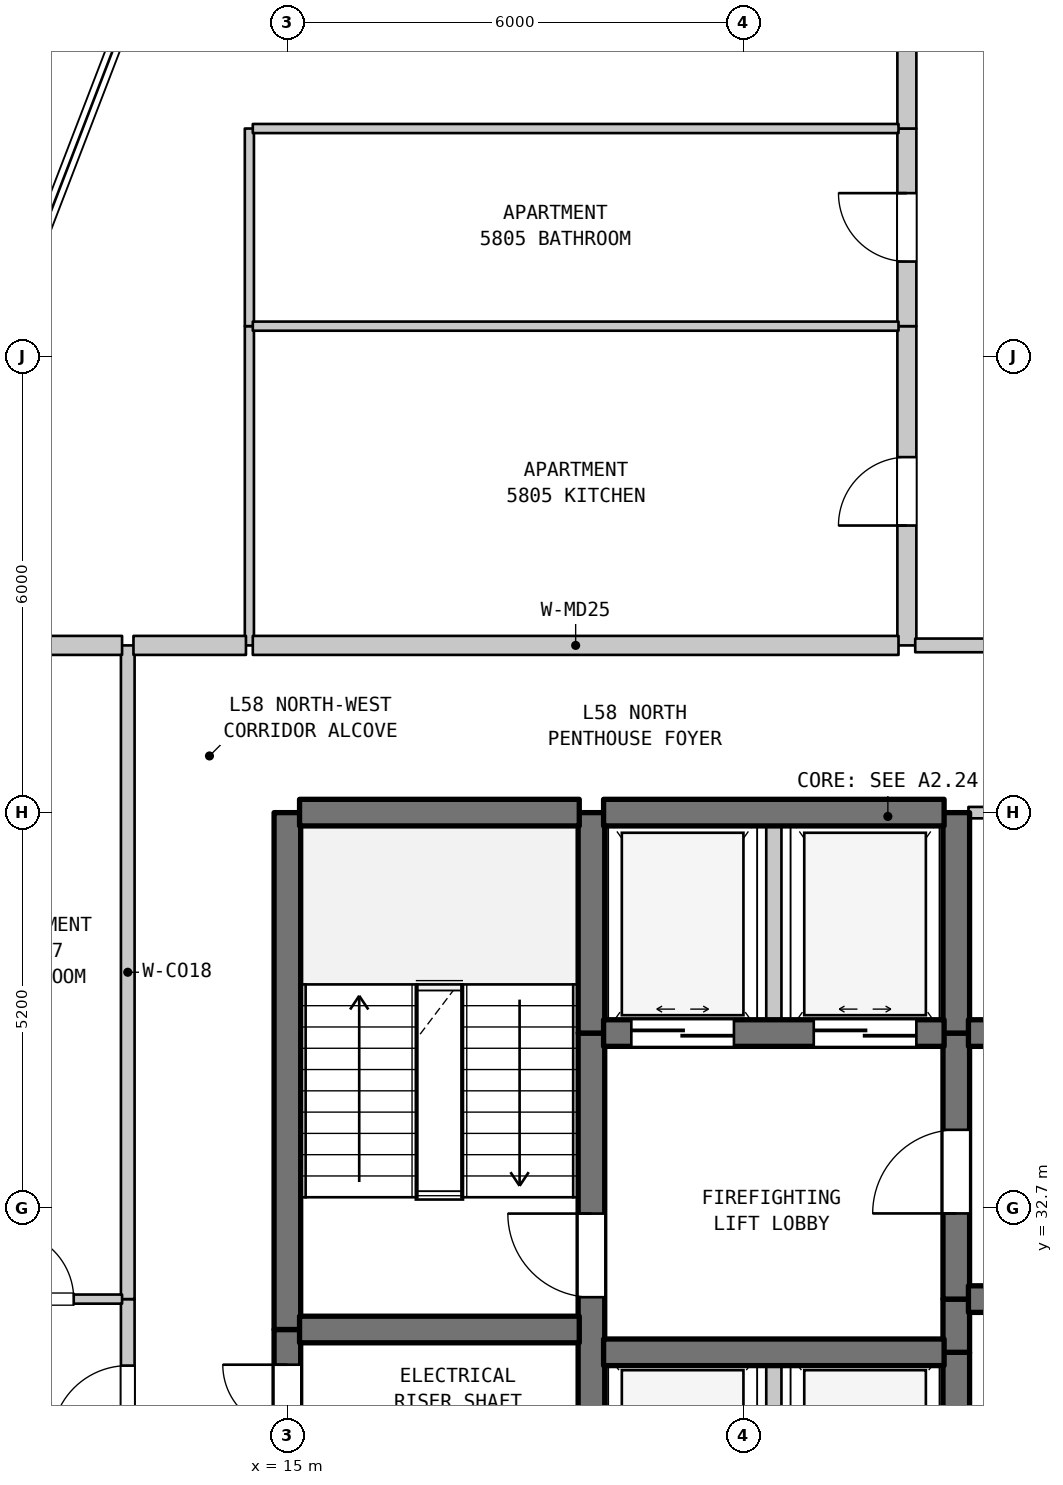
"""IFC4 building model, lengths in metres.
Left out: names, types, materials, properties, quantities, classifications, styles, units other than length and angle.
Written with IfcOpenShell. Run it as: python <this file> out.ifc"""

import sys

from ifc_helpers import new_model, si_unit, direction, frame, frame_2d, origin, place, context, subcontext, project, spatial, rectangle, extrude, element, fill, save


model = new_model("IFC4")
c1 = context("Model", 3, precision=1e-05, world=origin(), true_north=direction((0.0, 1.0)))
c2 = subcontext(c1, "Body", "Model", "MODEL_VIEW")
j1 = project(units=[si_unit("LENGTHUNIT", "METRE"), si_unit("PLANEANGLEUNIT", "RADIAN")], contexts=[c1])
p1 = place(None, origin())
s1 = spatial("IfcSite", under=j1, at=p1, CompositionType="ELEMENT")
p2 = place(p1, origin())
s2 = spatial("IfcBuilding", under=s1, at=p2, CompositionType="ELEMENT")
p3 = place(p2, frame((0.0, 0.0, 233.9)))
s3 = spatial("IfcBuildingStorey", under=s2, at=p3, CompositionType="ELEMENT", Elevation=233.9)
p4 = place(p3, frame((12.9, 28.75, 0.0), z_axis=(0.0, 0.0, 1.0), x_axis=(0.0, 1.0, 0.0)))
e1 = element("IfcWall", 1, at=p4, inside=s3, PredefinedType="STANDARD", context=c2, shape_type="SweptSolid", body=[
    extrude(rectangle(XDim=2.75, YDim=0.18, at=frame_2d((1.375, 0.0))), origin(), (0.0, 0.0, 1.0), 3.28),
])
p5 = place(p4, frame((0.875, 0.0, 0.0)))
e2 = element("IfcOpeningElement", 2, at=p5, cuts=e1, PredefinedType="OPENING", context=c2, shape_type="SweptSolid", body=[
    extrude(rectangle(XDim=1.0, YDim=2.15, at=frame_2d((0.5, 1.075))), frame((0.0, 0.1, 0.0), z_axis=(0.0, -1.0, 0.0), x_axis=(1.0, 0.0, 0.0)), (0.0, 0.0, 1.0), 0.2),
])
p6 = place(p3, frame((12.9, 31.5, 0.0), z_axis=(0.0, 0.0, 1.0), x_axis=(0.0, 1.0, 0.0)))
e3 = element("IfcWall", 3, at=p6, inside=s3, PredefinedType="STANDARD", context=c2, shape_type="SweptSolid", body=[
    extrude(rectangle(XDim=8.6, YDim=0.18, at=frame_2d((4.3, 0.0))), origin(), (0.0, 0.0, 1.0), 3.28),
])
p7 = place(p3, frame((14.5, 40.1, 0.0), z_axis=(0.0, 0.0, 1.0), x_axis=(0.0, 1.0, 0.0)))
e4 = element("IfcWall", 4, at=p7, inside=s3, PredefinedType="PARTITIONING", context=c2, shape_type="SweptSolid", body=[
    extrude(rectangle(XDim=4.2, YDim=0.12, at=frame_2d((2.1, 0.0))), origin(), (0.0, 0.0, 1.0), 3.28),
])
p8 = place(p3, frame((14.5, 44.3, 0.0), z_axis=(0.0, 0.0, 1.0), x_axis=(0.0, 1.0, 0.0)))
e5 = element("IfcWall", 5, at=p8, inside=s3, PredefinedType="PARTITIONING", context=c2, shape_type="SweptSolid", body=[
    extrude(rectangle(XDim=2.6, YDim=0.12, at=frame_2d((1.3, 0.0))), origin(), (0.0, 0.0, 1.0), 3.28),
])
p9 = place(p3, frame((15.0, 29.5, 0.0), z_axis=(0.0, 0.0, 1.0), x_axis=(0.0, 1.0, 0.0)))
e6 = element("IfcWall", 6, at=p9, inside=s3, PredefinedType="SHEAR", context=c2, shape_type="SweptSolid", body=[
    extrude(rectangle(XDim=1.6, YDim=0.35, at=frame_2d((0.8, 0.0))), origin(), (0.0, 0.0, 1.0), 3.28),
])
p10 = place(p9, frame((0.287, 0.0, 0.0)))
e7 = element("IfcOpeningElement", 7, at=p10, cuts=e6, PredefinedType="OPENING", context=c2, shape_type="SweptSolid", body=[
    extrude(rectangle(XDim=0.85, YDim=2.1, at=frame_2d((0.425, 1.05))), frame((0.0, 0.185, 0.0), z_axis=(0.0, -1.0, 0.0), x_axis=(1.0, 0.0, 0.0)), (0.0, 0.0, 1.0), 0.37),
])
p11 = place(p3, frame((15.0, 31.1, 0.0), z_axis=(0.0, 0.0, 1.0), x_axis=(0.0, 1.0, 0.0)))
e8 = element("IfcWall", 8, at=p11, inside=s3, PredefinedType="SHEAR", context=c2, shape_type="SweptSolid", body=[
    extrude(rectangle(XDim=6.8, YDim=0.35, at=frame_2d((3.4, 0.0))), origin(), (0.0, 0.0, 1.0), 3.28),
])
p12 = place(p3, frame((19.0, 29.5, 0.0), z_axis=(0.0, 0.0, 1.0), x_axis=(0.0, 1.0, 0.0)))
e9 = element("IfcWall", 9, at=p12, inside=s3, PredefinedType="SHEAR", context=c2, shape_type="SweptSolid", body=[
    extrude(rectangle(XDim=5.5, YDim=0.35, at=frame_2d((2.75, 0.0))), origin(), (0.0, 0.0, 1.0), 3.28),
])
p13 = place(p12, frame((2.025, 0.0, 0.0)))
e10 = element("IfcOpeningElement", 10, at=p13, cuts=e9, PredefinedType="OPENING", context=c2, shape_type="SweptSolid", body=[
    extrude(rectangle(XDim=1.1, YDim=2.15, at=frame_2d((0.55, 1.075))), frame((0.0, 0.185, 0.0), z_axis=(0.0, -1.0, 0.0), x_axis=(1.0, 0.0, 0.0)), (0.0, 0.0, 1.0), 0.37),
])
p14 = place(p3, frame((19.0, 35.0, 0.0), z_axis=(0.0, 0.0, 1.0), x_axis=(0.0, 1.0, 0.0)))
e11 = element("IfcWall", 11, at=p14, inside=s3, PredefinedType="SHEAR", context=c2, shape_type="SweptSolid", body=[
    extrude(rectangle(XDim=2.9, YDim=0.35, at=frame_2d((1.45, 0.0))), origin(), (0.0, 0.0, 1.0), 3.28),
])
p15 = place(p3, frame((21.4, 28.2, 0.0), z_axis=(0.0, 0.0, 1.0), x_axis=(0.0, 1.0, 0.0)))
e12 = element("IfcWall", 12, at=p15, inside=s3, PredefinedType="STANDARD", context=c2, shape_type="SweptSolid", body=[
    extrude(rectangle(XDim=2.6, YDim=0.2, at=frame_2d((1.3, 0.0))), origin(), (0.0, 0.0, 1.0), 3.28),
])
p16 = place(p3, frame((21.4, 35.0, 0.0), z_axis=(0.0, 0.0, 1.0), x_axis=(0.0, 1.0, 0.0)))
e13 = element("IfcWall", 13, at=p16, inside=s3, PredefinedType="STANDARD", context=c2, shape_type="SweptSolid", body=[
    extrude(rectangle(XDim=2.9, YDim=0.2, at=frame_2d((1.45, 0.0))), origin(), (0.0, 0.0, 1.0), 3.28),
])
p17 = place(p3, frame((23.15, 40.1, 0.0), z_axis=(0.0, 0.0, 1.0), x_axis=(0.0, 1.0, 0.0)))
e14 = element("IfcWall", 14, at=p17, inside=s3, PredefinedType="STANDARD", context=c2, shape_type="SweptSolid", body=[
    extrude(rectangle(XDim=4.2, YDim=0.25, at=frame_2d((2.1, 0.0))), origin(), (0.0, 0.0, 1.0), 3.28),
])
p18 = place(p17, frame((1.577, 0.0, 0.0)))
e15 = element("IfcOpeningElement", 15, at=p18, cuts=e14, PredefinedType="OPENING", context=c2, shape_type="SweptSolid", body=[
    extrude(rectangle(XDim=0.9, YDim=2.15, at=frame_2d((0.45, 1.075))), frame((0.0, 0.135, 0.0), z_axis=(0.0, -1.0, 0.0), x_axis=(1.0, 0.0, 0.0)), (0.0, 0.0, 1.0), 0.27),
])
p19 = place(p3, frame((23.15, 44.3, 0.0), z_axis=(0.0, 0.0, 1.0), x_axis=(0.0, 1.0, 0.0)))
e16 = element("IfcWall", 16, at=p19, inside=s3, PredefinedType="STANDARD", context=c2, shape_type="SweptSolid", body=[
    extrude(rectangle(XDim=2.6, YDim=0.25, at=frame_2d((1.3, 0.0))), origin(), (0.0, 0.0, 1.0), 3.28),
])
p20 = place(p19, frame((0.85, 0.0, 0.0)))
e17 = element("IfcOpeningElement", 17, at=p20, cuts=e16, PredefinedType="OPENING", context=c2, shape_type="SweptSolid", body=[
    extrude(rectangle(XDim=0.9, YDim=2.1, at=frame_2d((0.45, 1.05))), frame((0.0, 0.135, 0.0), z_axis=(0.0, -1.0, 0.0), x_axis=(1.0, 0.0, 0.0)), (0.0, 0.0, 1.0), 0.27),
])
p21 = place(p3, frame((23.15, 46.9, 0.0), z_axis=(0.0, 0.0, 1.0), x_axis=(0.0, 1.0, 0.0)))
e18 = element("IfcWall", 18, at=p21, inside=s3, PredefinedType="STANDARD", context=c2, shape_type="SweptSolid", body=[
    extrude(rectangle(XDim=6.99, YDim=0.25, at=frame_2d((3.495, 0.0))), origin(), (0.0, 0.0, 1.0), 3.28),
])
p22 = place(p21, frame((2.949, 0.0, 0.0)))
e19 = element("IfcOpeningElement", 19, at=p22, cuts=e18, PredefinedType="OPENING", context=c2, shape_type="SweptSolid", body=[
    extrude(rectangle(XDim=0.95, YDim=2.15, at=frame_2d((0.475, 1.075))), frame((0.0, 0.135, 0.0), z_axis=(0.0, -1.0, 0.0), x_axis=(1.0, 0.0, 0.0)), (0.0, 0.0, 1.0), 0.27),
])
p23 = place(p3, frame((23.8, 29.5, 0.0), z_axis=(0.0, 0.0, 1.0), x_axis=(0.0, 1.0, 0.0)))
e20 = element("IfcWall", 20, at=p23, inside=s3, PredefinedType="SHEAR", context=c2, shape_type="SweptSolid", body=[
    extrude(rectangle(XDim=1.3, YDim=0.35, at=frame_2d((0.65, 0.0))), origin(), (0.0, 0.0, 1.0), 3.28),
])
p24 = place(p3, frame((23.8, 30.8, 0.0), z_axis=(0.0, 0.0, 1.0), x_axis=(0.0, 1.0, 0.0)))
e21 = element("IfcWall", 21, at=p24, inside=s3, PredefinedType="SHEAR", context=c2, shape_type="SweptSolid", body=[
    extrude(rectangle(XDim=0.7, YDim=0.35, at=frame_2d((0.35, 0.0))), origin(), (0.0, 0.0, 1.0), 3.28),
])
p25 = place(p3, frame((23.8, 31.5, 0.0), z_axis=(0.0, 0.0, 1.0), x_axis=(0.0, 1.0, 0.0)))
e22 = element("IfcWall", 22, at=p25, inside=s3, PredefinedType="SHEAR", context=c2, shape_type="SweptSolid", body=[
    extrude(rectangle(XDim=3.5, YDim=0.35, at=frame_2d((1.75, 0.0))), origin(), (0.0, 0.0, 1.0), 3.28),
])
p26 = place(p25, frame((1.127, 0.0, 0.0)))
e23 = element("IfcOpeningElement", 23, at=p26, cuts=e22, PredefinedType="OPENING", context=c2, shape_type="SweptSolid", body=[
    extrude(rectangle(XDim=1.1, YDim=2.15, at=frame_2d((0.55, 1.075))), frame((0.0, 0.185, 0.0), z_axis=(0.0, -1.0, 0.0), x_axis=(1.0, 0.0, 0.0)), (0.0, 0.0, 1.0), 0.37),
])
p27 = place(p3, frame((23.8, 35.0, 0.0), z_axis=(0.0, 0.0, 1.0), x_axis=(0.0, 1.0, 0.0)))
e24 = element("IfcWall", 24, at=p27, inside=s3, PredefinedType="SHEAR", context=c2, shape_type="SweptSolid", body=[
    extrude(rectangle(XDim=2.9, YDim=0.35, at=frame_2d((1.45, 0.0))), origin(), (0.0, 0.0, 1.0), 3.28),
])
p28 = place(p3, frame((19.16, 30.8, 0.0), z_axis=(0.0, 0.0, 1.0), x_axis=(1.0, 0.0, 0.0)))
e25 = element("IfcWall", 25, at=p28, inside=s3, PredefinedType="SHEAR", context=c2, shape_type="SweptSolid", body=[
    extrude(rectangle(XDim=4.48, YDim=0.35, at=frame_2d((2.24, 0.0))), origin(), (0.0, 0.0, 1.0), 3.28),
])
p29 = place(p3, frame((15.16, 31.1, 0.0), z_axis=(0.0, 0.0, 1.0), x_axis=(1.0, 0.0, 0.0)))
e26 = element("IfcWall", 26, at=p29, inside=s3, PredefinedType="SHEAR", context=c2, shape_type="SweptSolid", body=[
    extrude(rectangle(XDim=3.68, YDim=0.35, at=frame_2d((1.84, 0.0))), origin(), (0.0, 0.0, 1.0), 3.28),
])
p30 = place(p3, frame((10.623, 31.5, 0.0), z_axis=(0.0, 0.0, 1.0), x_axis=(1.0, 0.0, 0.0)))
e27 = element("IfcWall", 27, at=p30, inside=s3, PredefinedType="PARTITIONING", context=c2, shape_type="SweptSolid", body=[
    extrude(rectangle(XDim=2.202, YDim=0.12, at=frame_2d((1.101, 0.0))), origin(), (0.0, 0.0, 1.0), 3.28),
])
p31 = place(p30, frame((0.666, 0.0, 0.0)))
e28 = element("IfcOpeningElement", 28, at=p31, cuts=e27, PredefinedType="OPENING", context=c2, shape_type="SweptSolid", body=[
    extrude(rectangle(XDim=0.9, YDim=2.1, at=frame_2d((0.45, 1.05))), frame((0.0, 0.07, 0.0), z_axis=(0.0, -1.0, 0.0), x_axis=(1.0, 0.0, 0.0)), (0.0, 0.0, 1.0), 0.14),
])
p32 = place(p3, frame((23.96, 31.5, 0.0), z_axis=(0.0, 0.0, 1.0), x_axis=(1.0, 0.0, 0.0)))
e29 = element("IfcWall", 29, at=p32, inside=s3, PredefinedType="SHEAR", context=c2, shape_type="SweptSolid", body=[
    extrude(rectangle(XDim=3.18, YDim=0.35, at=frame_2d((1.59, 0.0))), origin(), (0.0, 0.0, 1.0), 3.28),
])
p33 = place(p32, frame((1.094, 0.0, 0.0)))
e30 = element("IfcOpeningElement", 30, at=p33, cuts=e29, PredefinedType="OPENING", context=c2, shape_type="SweptSolid", body=[
    extrude(rectangle(XDim=0.85, YDim=2.1, at=frame_2d((0.425, 1.05))), frame((0.0, 0.185, 0.0), z_axis=(0.0, -1.0, 0.0), x_axis=(1.0, 0.0, 0.0)), (0.0, 0.0, 1.0), 0.37),
])
p34 = place(p3, frame((19.16, 35.0, 0.0), z_axis=(0.0, 0.0, 1.0), x_axis=(1.0, 0.0, 0.0)))
e31 = element("IfcWall", 31, at=p34, inside=s3, PredefinedType="SHEAR", context=c2, shape_type="SweptSolid", body=[
    extrude(rectangle(XDim=4.48, YDim=0.35, at=frame_2d((2.24, 0.0))), origin(), (0.0, 0.0, 1.0), 3.28),
])
p35 = place(p34, frame((0.365, 0.0, 0.0)))
e32 = element("IfcOpeningElement", 32, at=p35, cuts=e31, PredefinedType="OPENING", context=c2, shape_type="SweptSolid", body=[
    extrude(rectangle(XDim=1.35, YDim=2.2, at=frame_2d((0.675, 1.1))), frame((0.0, 0.185, 0.0), z_axis=(0.0, -1.0, 0.0), x_axis=(1.0, 0.0, 0.0)), (0.0, 0.0, 1.0), 0.37),
])
p36 = place(p34, frame((2.765, 0.0, 0.0)))
e33 = element("IfcOpeningElement", 33, at=p36, cuts=e31, PredefinedType="OPENING", context=c2, shape_type="SweptSolid", body=[
    extrude(rectangle(XDim=1.35, YDim=2.2, at=frame_2d((0.675, 1.1))), frame((0.0, 0.185, 0.0), z_axis=(0.0, -1.0, 0.0), x_axis=(1.0, 0.0, 0.0)), (0.0, 0.0, 1.0), 0.37),
])
p37 = place(p3, frame((23.96, 35.0, 0.0), z_axis=(0.0, 0.0, 1.0), x_axis=(1.0, 0.0, 0.0)))
e34 = element("IfcWall", 34, at=p37, inside=s3, PredefinedType="SHEAR", context=c2, shape_type="SweptSolid", body=[
    extrude(rectangle(XDim=3.995, YDim=0.35, at=frame_2d((1.998, 0.0))), origin(), (0.0, 0.0, 1.0), 3.28),
])
p38 = place(p37, frame((1.393, 0.0, 0.0)))
e35 = element("IfcOpeningElement", 35, at=p38, cuts=e34, PredefinedType="OPENING", context=c2, shape_type="SweptSolid", body=[
    extrude(rectangle(XDim=0.95, YDim=2.15, at=frame_2d((0.475, 1.075))), frame((0.0, 0.185, 0.0), z_axis=(0.0, -1.0, 0.0), x_axis=(1.0, 0.0, 0.0)), (0.0, 0.0, 1.0), 0.37),
])
p39 = place(p3, frame((15.16, 37.9, 0.0), z_axis=(0.0, 0.0, 1.0), x_axis=(1.0, 0.0, 0.0)))
e36 = element("IfcWall", 36, at=p39, inside=s3, PredefinedType="SHEAR", context=c2, shape_type="SweptSolid", body=[
    extrude(rectangle(XDim=3.68, YDim=0.35, at=frame_2d((1.84, 0.0))), origin(), (0.0, 0.0, 1.0), 3.28),
])
p40 = place(p3, frame((19.16, 37.9, 0.0), z_axis=(0.0, 0.0, 1.0), x_axis=(1.0, 0.0, 0.0)))
e37 = element("IfcWall", 37, at=p40, inside=s3, PredefinedType="SHEAR", context=c2, shape_type="SweptSolid", body=[
    extrude(rectangle(XDim=4.48, YDim=0.35, at=frame_2d((2.24, 0.0))), origin(), (0.0, 0.0, 1.0), 3.28),
])
p41 = place(p3, frame((23.96, 37.9, 0.0), z_axis=(0.0, 0.0, 1.0), x_axis=(1.0, 0.0, 0.0)))
e38 = element("IfcWall", 38, at=p41, inside=s3, PredefinedType="STANDARD", context=c2, shape_type="SweptSolid", body=[
    extrude(rectangle(XDim=3.995, YDim=0.15, at=frame_2d((1.998, 0.0))), origin(), (0.0, 0.0, 1.0), 2.68),
])
p42 = place(p3, frame((10.623, 40.1, 0.0), z_axis=(0.0, 0.0, 1.0), x_axis=(1.0, 0.0, 0.0)))
e39 = element("IfcWall", 39, at=p42, inside=s3, PredefinedType="STANDARD", context=c2, shape_type="SweptSolid", body=[
    extrude(rectangle(XDim=2.202, YDim=0.25, at=frame_2d((1.101, 0.0))), origin(), (0.0, 0.0, 1.0), 3.28),
])
p43 = place(p3, frame((12.975, 40.1, 0.0), z_axis=(0.0, 0.0, 1.0), x_axis=(1.0, 0.0, 0.0)))
e40 = element("IfcWall", 40, at=p43, inside=s3, PredefinedType="STANDARD", context=c2, shape_type="SweptSolid", body=[
    extrude(rectangle(XDim=1.48, YDim=0.25, at=frame_2d((0.74, 0.0))), origin(), (0.0, 0.0, 1.0), 3.28),
])
p44 = place(p3, frame((14.545, 40.1, 0.0), z_axis=(0.0, 0.0, 1.0), x_axis=(1.0, 0.0, 0.0)))
e41 = element("IfcWall", 41, at=p44, inside=s3, PredefinedType="STANDARD", context=c2, shape_type="SweptSolid", body=[
    extrude(rectangle(XDim=8.495, YDim=0.25, at=frame_2d((4.248, 0.0))), origin(), (0.0, 0.0, 1.0), 3.28),
])
p45 = place(p3, frame((23.26, 40.1, 0.0), z_axis=(0.0, 0.0, 1.0), x_axis=(1.0, 0.0, 0.0)))
e42 = element("IfcWall", 42, at=p45, inside=s3, PredefinedType="STANDARD", context=c2, shape_type="SweptSolid", body=[
    extrude(rectangle(XDim=5.845, YDim=0.18, at=frame_2d((2.922, 0.0))), origin(), (0.0, 0.0, 1.0), 3.28),
])
p46 = place(p45, frame((2.39, 0.0, 0.0)))
e43 = element("IfcOpeningElement", 43, at=p46, cuts=e42, PredefinedType="OPENING", context=c2, shape_type="SweptSolid", body=[
    extrude(rectangle(XDim=1.0, YDim=2.15, at=frame_2d((0.5, 1.075))), frame((0.0, 0.1, 0.0), z_axis=(0.0, -1.0, 0.0), x_axis=(1.0, 0.0, 0.0)), (0.0, 0.0, 1.0), 0.2),
])
for number, where, z_axis, x_axis in (
    (44, (14.545, 44.3, 0.0), (0.0, 0.0, 1.0), (1.0, 0.0, 0.0)),
    (45, (14.545, 46.9, 0.0), (0.0, 0.0, 1.0), (1.0, 0.0, 0.0)),
):
    element("IfcWall", number, at=place(p3, frame(where, z_axis=z_axis, x_axis=x_axis)), inside=s3, PredefinedType="PARTITIONING", context=c2, shape_type="SweptSolid", body=[
        extrude(rectangle(XDim=8.495, YDim=0.12, at=frame_2d((4.248, 0.0))), origin(), (0.0, 0.0, 1.0), 3.28),
    ])
p47 = place(p5, origin())
e46 = element("IfcDoor", 46, at=p47, inside=s3, OperationType="SINGLE_SWING_LEFT", PredefinedType="DOOR", context=c2, shape_type="SweptSolid", body=[
    extrude(rectangle(XDim=1.0, YDim=2.15, at=frame_2d((0.5, 1.075))), frame((0.0, 0.025, 0.0), z_axis=(0.0, -1.0, 0.0), x_axis=(1.0, 0.0, 0.0)), (0.0, 0.0, 1.0), 0.05),
])
fill(e2, e46)
p48 = place(p10, origin())
e47 = element("IfcDoor", 47, at=p48, inside=s3, OperationType="SINGLE_SWING_RIGHT", PredefinedType="DOOR", context=c2, shape_type="SweptSolid", body=[
    extrude(rectangle(XDim=0.85, YDim=2.1, at=frame_2d((0.425, 1.05))), frame((0.0, 0.025, 0.0), z_axis=(0.0, -1.0, 0.0), x_axis=(1.0, 0.0, 0.0)), (0.0, 0.0, 1.0), 0.05),
])
fill(e7, e47)
p49 = place(p13, origin())
e48 = element("IfcDoor", 48, at=p49, inside=s3, OperationType="SINGLE_SWING_RIGHT", PredefinedType="DOOR", context=c2, shape_type="SweptSolid", body=[
    extrude(rectangle(XDim=1.1, YDim=2.15, at=frame_2d((0.55, 1.075))), frame((0.0, 0.025, 0.0), z_axis=(0.0, -1.0, 0.0), x_axis=(1.0, 0.0, 0.0)), (0.0, 0.0, 1.0), 0.05),
])
fill(e10, e48)
p50 = place(p18, origin())
e49 = element("IfcDoor", 49, at=p50, inside=s3, OperationType="SINGLE_SWING_LEFT", PredefinedType="DOOR", context=c2, shape_type="SweptSolid", body=[
    extrude(rectangle(XDim=0.9, YDim=2.15, at=frame_2d((0.45, 1.075))), frame((0.0, 0.025, 0.0), z_axis=(0.0, -1.0, 0.0), x_axis=(1.0, 0.0, 0.0)), (0.0, 0.0, 1.0), 0.05),
])
fill(e15, e49)
p51 = place(p20, origin())
e50 = element("IfcDoor", 50, at=p51, inside=s3, OperationType="SINGLE_SWING_RIGHT", PredefinedType="DOOR", context=c2, shape_type="SweptSolid", body=[
    extrude(rectangle(XDim=0.9, YDim=2.1, at=frame_2d((0.45, 1.05))), frame((0.0, 0.025, 0.0), z_axis=(0.0, -1.0, 0.0), x_axis=(1.0, 0.0, 0.0)), (0.0, 0.0, 1.0), 0.05),
])
fill(e17, e50)
p52 = place(p26, origin())
e51 = element("IfcDoor", 51, at=p52, inside=s3, OperationType="SINGLE_SWING_LEFT", PredefinedType="DOOR", context=c2, shape_type="SweptSolid", body=[
    extrude(rectangle(XDim=1.1, YDim=2.15, at=frame_2d((0.55, 1.075))), frame((0.0, 0.025, 0.0), z_axis=(0.0, -1.0, 0.0), x_axis=(1.0, 0.0, 0.0)), (0.0, 0.0, 1.0), 0.05),
])
fill(e23, e51)
p53 = place(p31, origin())
e52 = element("IfcDoor", 52, at=p53, inside=s3, OperationType="SINGLE_SWING_LEFT", PredefinedType="DOOR", context=c2, shape_type="SweptSolid", body=[
    extrude(rectangle(XDim=0.9, YDim=2.1, at=frame_2d((0.45, 1.05))), frame((0.0, 0.025, 0.0), z_axis=(0.0, -1.0, 0.0), x_axis=(1.0, 0.0, 0.0)), (0.0, 0.0, 1.0), 0.05),
])
fill(e28, e52)
p54 = place(p35, origin())
e53 = element("IfcDoor", 53, at=p54, inside=s3, OperationType="DOUBLE_DOOR_SLIDING", PredefinedType="DOOR", context=c2, shape_type="SweptSolid", body=[
    extrude(rectangle(XDim=1.35, YDim=2.2, at=frame_2d((0.675, 1.1))), frame((0.0, 0.025, 0.0), z_axis=(0.0, -1.0, 0.0), x_axis=(1.0, 0.0, 0.0)), (0.0, 0.0, 1.0), 0.05),
])
fill(e32, e53)
p55 = place(p36, origin())
e54 = element("IfcDoor", 54, at=p55, inside=s3, OperationType="DOUBLE_DOOR_SLIDING", PredefinedType="DOOR", context=c2, shape_type="SweptSolid", body=[
    extrude(rectangle(XDim=1.35, YDim=2.2, at=frame_2d((0.675, 1.1))), frame((0.0, 0.025, 0.0), z_axis=(0.0, -1.0, 0.0), x_axis=(1.0, 0.0, 0.0)), (0.0, 0.0, 1.0), 0.05),
])
fill(e33, e54)
save(model, sys.argv[1])
